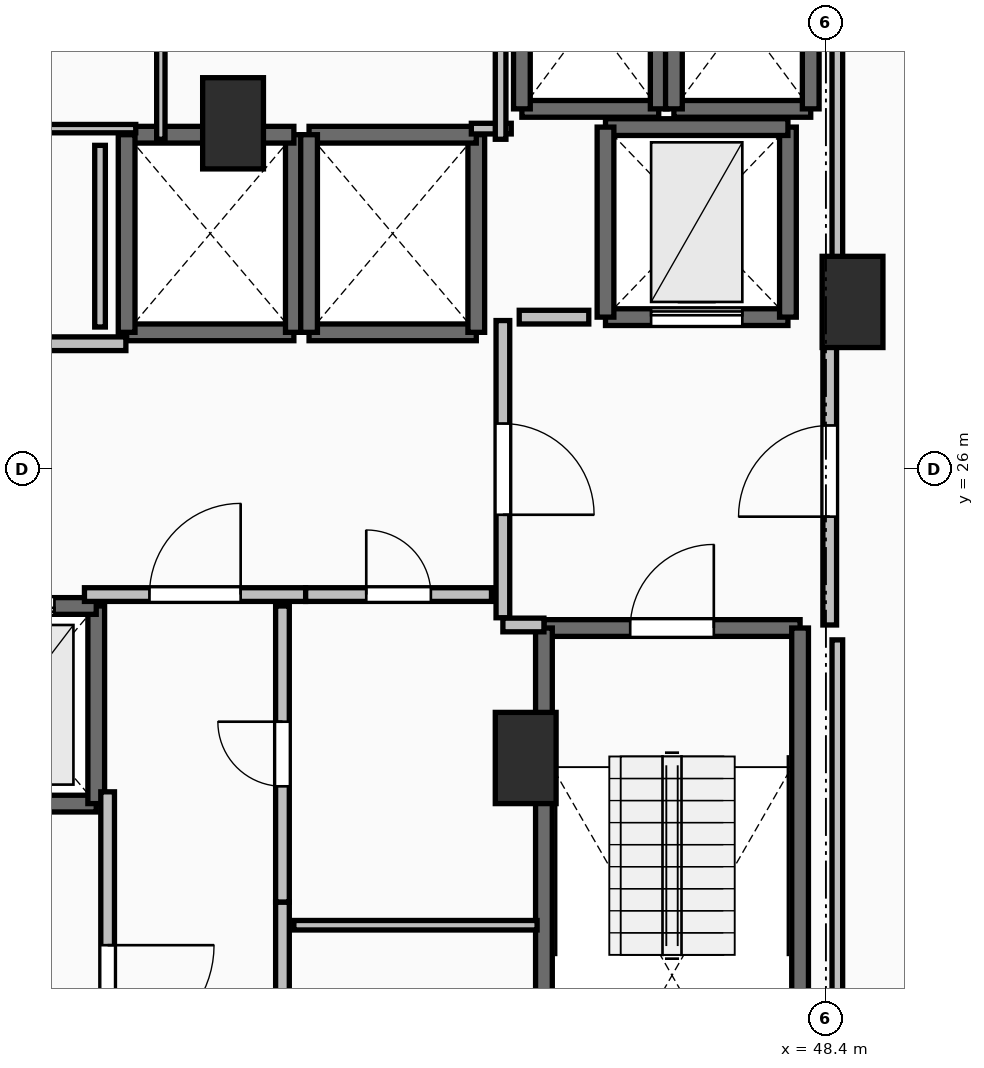
"""IFC4 building model, lengths in metres.
Left out: names, types, materials, properties, quantities, classifications, styles, units other than length and angle.
Written with IfcOpenShell. Run it as: python <this file> out.ifc"""

import sys

from ifc_helpers import new_model, si_unit, direction, frame, frame_2d, origin, origin_2d, place, context, subcontext, project, spatial, rectangle, extrude, element, fill, save


model = new_model("IFC4")
c1 = context("Model", 3, precision=1e-05, world=origin(), true_north=direction((0.0, 1.0)))
c2 = subcontext(c1, "Body", "Model", "MODEL_VIEW")
j1 = project(units=[si_unit("LENGTHUNIT", "METRE"), si_unit("PLANEANGLEUNIT", "RADIAN")], contexts=[c1])
p1 = place(None, origin())
s1 = spatial("IfcSite", under=j1, at=p1, CompositionType="ELEMENT")
p2 = place(p1, origin())
s2 = spatial("IfcBuilding", under=s1, at=p2, CompositionType="ELEMENT")
p3 = place(p2, frame((0.0, 0.0, 167.6)))
s3 = spatial("IfcBuildingStorey", under=s2, at=p3, CompositionType="ELEMENT", Elevation=167.6)
for number, where, z_axis, x_axis in (
    (1, (48.75, 28.2, 0.0), (0.0, 0.0, 1.0), (1.0, 0.0, 0.0)),
    (2, (44.45, 22.2, 0.0), (0.0, 0.0, 1.0), (1.0, 0.0, 0.0)),
    (3, (40.6, 30.55, 0.0), (0.0, 0.0, 1.0), (1.0, 0.0, 0.0)),
):
    element("IfcColumn", number, at=place(p3, frame(where, z_axis=z_axis, x_axis=x_axis)), inside=s3, PredefinedType="PILASTER", context=c2, shape_type="SweptSolid", body=[
        extrude(rectangle(XDim=0.8, YDim=1.2, at=origin_2d()), origin(), (0.0, 0.0, 1.0), 3.5),
    ])
p4 = place(p3, frame((44.69, 23.91, 0.0), z_axis=(0.0, 0.0, 1.0), x_axis=(1.0, 0.0, 0.0)))
e4 = element("IfcWall", 4, at=p4, inside=s3, PredefinedType="SOLIDWALL", context=c2, shape_type="SweptSolid", body=[
    extrude(rectangle(XDim=3.37, YDim=0.22, at=frame_2d((1.685, 0.0))), origin(), (0.0, 0.0, 1.0), 3.24),
])
p5 = place(p4, frame((1.135, 0.0, 0.0)))
e5 = element("IfcOpeningElement", 5, at=p5, cuts=e4, PredefinedType="OPENING", context=c2, shape_type="SweptSolid", body=[
    extrude(rectangle(XDim=1.1, YDim=2.15, at=frame_2d((0.55, 1.075))), frame((0.0, 0.125, 0.0), z_axis=(0.0, -1.0, 0.0), x_axis=(1.0, 0.0, 0.0)), (0.0, 0.0, 1.0), 0.25),
])
for number, where, z_axis, x_axis in (
    (6, (48.06, 23.91, 0.0), (0.0, 0.0, 1.0), (0.0, -1.0, 0.0)),
    (7, (44.69, 16.49, 0.0), (0.0, 0.0, 1.0), (0.0, 1.0, 0.0)),
):
    element("IfcWall", number, at=place(p3, frame(where, z_axis=z_axis, x_axis=x_axis)), inside=s3, PredefinedType="SOLIDWALL", context=c2, shape_type="SweptSolid", body=[
        extrude(rectangle(XDim=7.42, YDim=0.22, at=frame_2d((3.71, 0.0))), origin(), (0.0, 0.0, 1.0), 3.24),
    ])
p6 = place(p3, frame((36.6, 21.6, 0.0), z_axis=(0.0, 0.0, 1.0), x_axis=(1.0, 0.0, 0.0)))
e8 = element("IfcWall", 8, at=p6, inside=s3, PredefinedType="SOLIDWALL", context=c2, shape_type="SweptSolid", body=[
    extrude(rectangle(XDim=2.2, YDim=0.22, at=frame_2d((1.1, 0.0))), origin(), (0.0, 0.0, 1.0), 3.24),
])
p7 = place(p3, frame((38.8, 21.6, 0.0), z_axis=(0.0, 0.0, 1.0), x_axis=(0.0, 1.0, 0.0)))
e9 = element("IfcWall", 9, at=p7, inside=s3, PredefinedType="SOLIDWALL", context=c2, shape_type="SweptSolid", body=[
    extrude(rectangle(XDim=2.6, YDim=0.22, at=frame_2d((1.3, 0.0))), origin(), (0.0, 0.0, 1.0), 3.24),
])
p8 = place(p3, frame((38.8, 24.2, 0.0), z_axis=(0.0, 0.0, 1.0), x_axis=(-1.0, 0.0, 0.0)))
e10 = element("IfcWall", 10, at=p8, inside=s3, PredefinedType="SOLIDWALL", context=c2, shape_type="SweptSolid", body=[
    extrude(rectangle(XDim=2.2, YDim=0.22, at=frame_2d((1.1, 0.0))), origin(), (0.0, 0.0, 1.0), 3.24),
])
p9 = place(p8, frame((0.55, 0.0, 0.0)))
e11 = element("IfcOpeningElement", 11, at=p9, cuts=e10, PredefinedType="OPENING", context=c2, shape_type="SweptSolid", body=[
    extrude(rectangle(XDim=1.1, YDim=2.2, at=frame_2d((0.55, 1.1))), frame((0.0, 0.125, 0.0), z_axis=(0.0, -1.0, 0.0), x_axis=(1.0, 0.0, 0.0)), (0.0, 0.0, 1.0), 0.25),
])
p10 = place(p3, frame((39.2, 27.8, 0.0), z_axis=(0.0, 0.0, 1.0), x_axis=(1.0, 0.0, 0.0)))
e12 = element("IfcWall", 12, at=p10, inside=s3, PredefinedType="SOLIDWALL", context=c2, shape_type="SweptSolid", body=[
    extrude(rectangle(XDim=2.2, YDim=0.22, at=frame_2d((1.1, 0.0))), origin(), (0.0, 0.0, 1.0), 3.24),
])
p11 = place(p3, frame((41.4, 27.8, 0.0), z_axis=(0.0, 0.0, 1.0), x_axis=(0.0, 1.0, 0.0)))
e13 = element("IfcWall", 13, at=p11, inside=s3, PredefinedType="SOLIDWALL", context=c2, shape_type="SweptSolid", body=[
    extrude(rectangle(XDim=2.6, YDim=0.22, at=frame_2d((1.3, 0.0))), origin(), (0.0, 0.0, 1.0), 3.24),
])
p12 = place(p3, frame((41.4, 30.4, 0.0), z_axis=(0.0, 0.0, 1.0), x_axis=(-1.0, 0.0, 0.0)))
e14 = element("IfcWall", 14, at=p12, inside=s3, PredefinedType="SOLIDWALL", context=c2, shape_type="SweptSolid", body=[
    extrude(rectangle(XDim=2.2, YDim=0.22, at=frame_2d((1.1, 0.0))), origin(), (0.0, 0.0, 1.0), 3.24),
])
p13 = place(p3, frame((39.2, 30.4, 0.0), z_axis=(0.0, 0.0, 1.0), x_axis=(0.0, -1.0, 0.0)))
e15 = element("IfcWall", 15, at=p13, inside=s3, PredefinedType="SOLIDWALL", context=c2, shape_type="SweptSolid", body=[
    extrude(rectangle(XDim=2.6, YDim=0.22, at=frame_2d((1.3, 0.0))), origin(), (0.0, 0.0, 1.0), 3.24),
])
p14 = place(p3, frame((41.6, 27.8, 0.0), z_axis=(0.0, 0.0, 1.0), x_axis=(1.0, 0.0, 0.0)))
e16 = element("IfcWall", 16, at=p14, inside=s3, PredefinedType="SOLIDWALL", context=c2, shape_type="SweptSolid", body=[
    extrude(rectangle(XDim=2.2, YDim=0.22, at=frame_2d((1.1, 0.0))), origin(), (0.0, 0.0, 1.0), 3.24),
])
p15 = place(p3, frame((43.8, 27.8, 0.0), z_axis=(0.0, 0.0, 1.0), x_axis=(0.0, 1.0, 0.0)))
e17 = element("IfcWall", 17, at=p15, inside=s3, PredefinedType="SOLIDWALL", context=c2, shape_type="SweptSolid", body=[
    extrude(rectangle(XDim=2.6, YDim=0.22, at=frame_2d((1.3, 0.0))), origin(), (0.0, 0.0, 1.0), 3.24),
])
p16 = place(p3, frame((43.8, 30.4, 0.0), z_axis=(0.0, 0.0, 1.0), x_axis=(-1.0, 0.0, 0.0)))
e18 = element("IfcWall", 18, at=p16, inside=s3, PredefinedType="SOLIDWALL", context=c2, shape_type="SweptSolid", body=[
    extrude(rectangle(XDim=2.2, YDim=0.22, at=frame_2d((1.1, 0.0))), origin(), (0.0, 0.0, 1.0), 3.24),
])
p17 = place(p3, frame((41.6, 30.4, 0.0), z_axis=(0.0, 0.0, 1.0), x_axis=(0.0, -1.0, 0.0)))
e19 = element("IfcWall", 19, at=p17, inside=s3, PredefinedType="SOLIDWALL", context=c2, shape_type="SweptSolid", body=[
    extrude(rectangle(XDim=2.6, YDim=0.22, at=frame_2d((1.3, 0.0))), origin(), (0.0, 0.0, 1.0), 3.24),
])
p18 = place(p3, frame((44.4, 30.74, 0.0), z_axis=(0.0, 0.0, 1.0), x_axis=(1.0, 0.0, 0.0)))
e20 = element("IfcWall", 20, at=p18, inside=s3, PredefinedType="SOLIDWALL", context=c2, shape_type="SweptSolid", body=[
    extrude(rectangle(XDim=1.8, YDim=0.22, at=frame_2d((0.9, 0.0))), origin(), (0.0, 0.0, 1.0), 3.24),
])
for number, where, z_axis, x_axis in (
    (21, (46.2, 30.74, 0.0), (0.0, 0.0, 1.0), (0.0, 1.0, 0.0)),
    (22, (44.4, 33.16, 0.0), (0.0, 0.0, 1.0), (0.0, -1.0, 0.0)),
):
    element("IfcWall", number, at=place(p3, frame(where, z_axis=z_axis, x_axis=x_axis)), inside=s3, PredefinedType="SOLIDWALL", context=c2, shape_type="SweptSolid", body=[
        extrude(rectangle(XDim=2.42, YDim=0.22, at=frame_2d((1.21, 0.0))), origin(), (0.0, 0.0, 1.0), 3.24),
    ])
p19 = place(p3, frame((46.4, 30.74, 0.0), z_axis=(0.0, 0.0, 1.0), x_axis=(1.0, 0.0, 0.0)))
e23 = element("IfcWall", 23, at=p19, inside=s3, PredefinedType="SOLIDWALL", context=c2, shape_type="SweptSolid", body=[
    extrude(rectangle(XDim=1.8, YDim=0.22, at=frame_2d((0.9, 0.0))), origin(), (0.0, 0.0, 1.0), 3.24),
])
for number, where, z_axis, x_axis in (
    (24, (48.2, 30.74, 0.0), (0.0, 0.0, 1.0), (0.0, 1.0, 0.0)),
    (25, (46.4, 33.16, 0.0), (0.0, 0.0, 1.0), (0.0, -1.0, 0.0)),
):
    element("IfcWall", number, at=place(p3, frame(where, z_axis=z_axis, x_axis=x_axis)), inside=s3, PredefinedType="SOLIDWALL", context=c2, shape_type="SweptSolid", body=[
        extrude(rectangle(XDim=2.42, YDim=0.22, at=frame_2d((1.21, 0.0))), origin(), (0.0, 0.0, 1.0), 3.24),
    ])
p20 = place(p3, frame((45.5, 28.0, 0.0), z_axis=(0.0, 0.0, 1.0), x_axis=(1.0, 0.0, 0.0)))
e26 = element("IfcWall", 26, at=p20, inside=s3, PredefinedType="SHEAR", context=c2, shape_type="SweptSolid", body=[
    extrude(rectangle(XDim=2.4, YDim=0.22, at=frame_2d((1.2, 0.0))), origin(), (0.0, 0.0, 1.0), 3.24),
])
p21 = place(p20, frame((0.6, 0.0, 0.0)))
e27 = element("IfcOpeningElement", 27, at=p21, cuts=e26, PredefinedType="OPENING", context=c2, shape_type="SweptSolid", body=[
    extrude(rectangle(XDim=1.2, YDim=2.2, at=frame_2d((0.6, 1.1))), frame((0.0, 0.125, 0.0), z_axis=(0.0, -1.0, 0.0), x_axis=(1.0, 0.0, 0.0)), (0.0, 0.0, 1.0), 0.25),
])
p22 = place(p3, frame((47.9, 28.0, 0.0), z_axis=(0.0, 0.0, 1.0), x_axis=(0.0, 1.0, 0.0)))
e28 = element("IfcWall", 28, at=p22, inside=s3, PredefinedType="SHEAR", context=c2, shape_type="SweptSolid", body=[
    extrude(rectangle(XDim=2.5, YDim=0.22, at=frame_2d((1.25, 0.0))), origin(), (0.0, 0.0, 1.0), 3.24),
])
p23 = place(p3, frame((47.9, 30.5, 0.0), z_axis=(0.0, 0.0, 1.0), x_axis=(-1.0, 0.0, 0.0)))
e29 = element("IfcWall", 29, at=p23, inside=s3, PredefinedType="SHEAR", context=c2, shape_type="SweptSolid", body=[
    extrude(rectangle(XDim=2.4, YDim=0.22, at=frame_2d((1.2, 0.0))), origin(), (0.0, 0.0, 1.0), 3.24),
])
p24 = place(p3, frame((45.5, 30.5, 0.0), z_axis=(0.0, 0.0, 1.0), x_axis=(0.0, -1.0, 0.0)))
e30 = element("IfcWall", 30, at=p24, inside=s3, PredefinedType="SHEAR", context=c2, shape_type="SweptSolid", body=[
    extrude(rectangle(XDim=2.5, YDim=0.22, at=frame_2d((1.25, 0.0))), origin(), (0.0, 0.0, 1.0), 3.24),
])
p25 = place(p3, frame((44.15, 27.955, 0.0), z_axis=(0.0, 0.0, 1.0), x_axis=(0.0, -1.0, 0.0)))
e31 = element("IfcWall", 31, at=p25, inside=s3, PredefinedType="PARTITIONING", context=c2, shape_type="SweptSolid", body=[
    extrude(rectangle(XDim=3.91, YDim=0.18, at=frame_2d((1.955, 0.0))), origin(), (0.0, 0.0, 1.0), 3.24),
])
p26 = place(p25, frame((1.355, 0.0, 0.0)))
e32 = element("IfcOpeningElement", 32, at=p26, cuts=e31, PredefinedType="OPENING", context=c2, shape_type="SweptSolid", body=[
    extrude(rectangle(XDim=1.2, YDim=2.15, at=frame_2d((0.6, 1.075))), frame((0.0, 0.105, 0.0), z_axis=(0.0, -1.0, 0.0), x_axis=(1.0, 0.0, 0.0)), (0.0, 0.0, 1.0), 0.21),
])
p27 = place(p3, frame((44.15, 23.95, 0.0), z_axis=(0.0, 0.0, 1.0), x_axis=(1.0, 0.0, 0.0)))
e33 = element("IfcWall", 33, at=p27, inside=s3, PredefinedType="PARTITIONING", context=c2, shape_type="SweptSolid", body=[
    extrude(rectangle(XDim=0.54, YDim=0.18, at=frame_2d((0.27, 0.0))), origin(), (0.0, 0.0, 1.0), 3.24),
])
p28 = place(p3, frame((48.45, 23.95, 0.0), z_axis=(0.0, 0.0, 1.0), x_axis=(0.0, 1.0, 0.0)))
e34 = element("IfcWall", 34, at=p28, inside=s3, PredefinedType="PARTITIONING", context=c2, shape_type="SweptSolid", body=[
    extrude(rectangle(XDim=4.05, YDim=0.18, at=frame_2d((2.025, 0.0))), origin(), (0.0, 0.0, 1.0), 3.24),
])
p29 = place(p28, frame((1.425, 0.0, 0.0)))
e35 = element("IfcOpeningElement", 35, at=p29, cuts=e34, PredefinedType="OPENING", context=c2, shape_type="SweptSolid", body=[
    extrude(rectangle(XDim=1.2, YDim=2.15, at=frame_2d((0.6, 1.075))), frame((0.0, 0.105, 0.0), z_axis=(0.0, -1.0, 0.0), x_axis=(1.0, 0.0, 0.0)), (0.0, 0.0, 1.0), 0.21),
])
p30 = place(p3, frame((38.645, 24.35, 0.0), z_axis=(0.0, 0.0, 1.0), x_axis=(1.0, 0.0, 0.0)))
e36 = element("IfcWall", 36, at=p30, inside=s3, PredefinedType="PARTITIONING", context=c2, shape_type="SweptSolid", body=[
    extrude(rectangle(XDim=2.91, YDim=0.18, at=frame_2d((1.455, 0.0))), origin(), (0.0, 0.0, 1.0), 3.24),
])
p31 = place(p30, frame((0.855, 0.0, 0.0)))
e37 = element("IfcOpeningElement", 37, at=p31, cuts=e36, PredefinedType="OPENING", context=c2, shape_type="SweptSolid", body=[
    extrude(rectangle(XDim=1.2, YDim=2.15, at=frame_2d((0.6, 1.075))), frame((0.0, 0.105, 0.0), z_axis=(0.0, -1.0, 0.0), x_axis=(1.0, 0.0, 0.0)), (0.0, 0.0, 1.0), 0.21),
])
p32 = place(p3, frame((41.555, 24.35, 0.0), z_axis=(0.0, 0.0, 1.0), x_axis=(1.0, 0.0, 0.0)))
e38 = element("IfcWall", 38, at=p32, inside=s3, PredefinedType="PARTITIONING", context=c2, shape_type="SweptSolid", body=[
    extrude(rectangle(XDim=2.445, YDim=0.18, at=frame_2d((1.223, 0.0))), origin(), (0.0, 0.0, 1.0), 3.24),
])
p33 = place(p32, frame((0.798, 0.0, 0.0)))
e39 = element("IfcOpeningElement", 39, at=p33, cuts=e38, PredefinedType="OPENING", context=c2, shape_type="SweptSolid", body=[
    extrude(rectangle(XDim=0.85, YDim=2.1, at=frame_2d((0.425, 1.05))), frame((0.0, 0.105, 0.0), z_axis=(0.0, -1.0, 0.0), x_axis=(1.0, 0.0, 0.0)), (0.0, 0.0, 1.0), 0.21),
])
p34 = place(p3, frame((39.19, 27.65, 0.0), z_axis=(0.0, 0.0, 1.0), x_axis=(-1.0, 0.0, 0.0)))
e40 = element("IfcWall", 40, at=p34, inside=s3, PredefinedType="PARTITIONING", context=c2, shape_type="SweptSolid", body=[
    extrude(rectangle(XDim=7.19, YDim=0.18, at=frame_2d((3.595, 0.0))), origin(), (0.0, 0.0, 1.0), 3.24),
])
p35 = place(p34, frame((3.095, 0.0, 0.0)))
e41 = element("IfcOpeningElement", 41, at=p35, cuts=e40, PredefinedType="OPENING", context=c2, shape_type="SweptSolid", body=[
    extrude(rectangle(XDim=1.0, YDim=2.15, at=frame_2d((0.5, 1.075))), frame((0.0, 0.105, 0.0), z_axis=(0.0, -1.0, 0.0), x_axis=(1.0, 0.0, 0.0)), (0.0, 0.0, 1.0), 0.21),
])
p36 = place(p3, frame((41.25, 16.32, 0.0), z_axis=(0.0, 0.0, 1.0), x_axis=(0.0, 1.0, 0.0)))
e42 = element("IfcWall", 42, at=p36, inside=s3, PredefinedType="PARTITIONING", context=c2, shape_type="SweptSolid", body=[
    extrude(rectangle(XDim=3.985, YDim=0.18, at=frame_2d((1.992, 0.0))), origin(), (0.0, 0.0, 1.0), 3.24),
])
p37 = place(p36, frame((1.593, 0.0, 0.0)))
e43 = element("IfcOpeningElement", 43, at=p37, cuts=e42, PredefinedType="OPENING", context=c2, shape_type="SweptSolid", body=[
    extrude(rectangle(XDim=0.8, YDim=2.05, at=frame_2d((0.4, 1.025))), frame((0.0, 0.105, 0.0), z_axis=(0.0, -1.0, 0.0), x_axis=(1.0, 0.0, 0.0)), (0.0, 0.0, 1.0), 0.21),
])
p38 = place(p3, frame((41.25, 20.305, 0.0), z_axis=(0.0, 0.0, 1.0), x_axis=(0.0, 1.0, 0.0)))
e44 = element("IfcWall", 44, at=p38, inside=s3, PredefinedType="PARTITIONING", context=c2, shape_type="SweptSolid", body=[
    extrude(rectangle(XDim=3.895, YDim=0.18, at=frame_2d((1.948, 0.0))), origin(), (0.0, 0.0, 1.0), 3.24),
])
p39 = place(p38, frame((1.522, 0.0, 0.0)))
e45 = element("IfcOpeningElement", 45, at=p39, cuts=e44, PredefinedType="OPENING", context=c2, shape_type="SweptSolid", body=[
    extrude(rectangle(XDim=0.85, YDim=2.1, at=frame_2d((0.425, 1.05))), frame((0.0, 0.105, 0.0), z_axis=(0.0, -1.0, 0.0), x_axis=(1.0, 0.0, 0.0)), (0.0, 0.0, 1.0), 0.21),
])
p40 = place(p3, frame((38.95, 21.755, 0.0), z_axis=(0.0, 0.0, 1.0), x_axis=(0.0, -1.0, 0.0)))
e46 = element("IfcWall", 46, at=p40, inside=s3, PredefinedType="PARTITIONING", context=c2, shape_type="SweptSolid", body=[
    extrude(rectangle(XDim=5.435, YDim=0.18, at=frame_2d((2.717, 0.0))), origin(), (0.0, 0.0, 1.0), 3.24),
])
p41 = place(p40, frame((2.018, 0.0, 0.0)))
e47 = element("IfcOpeningElement", 47, at=p41, cuts=e46, PredefinedType="OPENING", context=c2, shape_type="SweptSolid", body=[
    extrude(rectangle(XDim=1.4, YDim=2.2, at=frame_2d((0.7, 1.1))), frame((0.0, 0.105, 0.0), z_axis=(0.0, -1.0, 0.0), x_axis=(1.0, 0.0, 0.0)), (0.0, 0.0, 1.0), 0.21),
])
p42 = place(p3, frame((44.6, 20.0, 0.0), z_axis=(0.0, 0.0, 1.0), x_axis=(-1.0, 0.0, 0.0)))
e48 = element("IfcWall", 48, at=p42, inside=s3, PredefinedType="PARTITIONING", context=c2, shape_type="SweptSolid", body=[
    extrude(rectangle(XDim=3.2, YDim=0.125, at=frame_2d((1.6, 0.0))), origin(), (0.0, 0.0, 1.0), 3.24),
])
p43 = place(p3, frame((39.65, 30.34, 0.0), z_axis=(0.0, 0.0, 1.0), x_axis=(0.0, 1.0, 0.0)))
e49 = element("IfcWall", 49, at=p43, inside=s3, PredefinedType="PARTITIONING", context=c2, shape_type="SweptSolid", body=[
    extrude(rectangle(XDim=3.56, YDim=0.11, at=frame_2d((1.78, 0.0))), origin(), (0.0, 0.0, 1.0), 2.432),
])
p44 = place(p3, frame((36.16, 30.48, 0.0), z_axis=(0.0, 0.0, 1.0), x_axis=(1.0, 0.0, 0.0)))
e50 = element("IfcWall", 50, at=p44, inside=s3, PredefinedType="PARTITIONING", context=c2, shape_type="SweptSolid", body=[
    extrude(rectangle(XDim=3.16, YDim=0.11, at=frame_2d((1.58, 0.0))), origin(), (0.0, 0.0, 1.0), 2.432),
])
p45 = place(p3, frame((45.28, 28.0, 0.0), z_axis=(0.0, 0.0, 1.0), x_axis=(-1.0, 0.0, 0.0)))
e51 = element("IfcWall", 51, at=p45, inside=s3, PredefinedType="PARTITIONING", context=c2, shape_type="SweptSolid", body=[
    extrude(rectangle(XDim=0.915, YDim=0.18, at=frame_2d((0.458, 0.0))), origin(), (0.0, 0.0, 1.0), 3.24),
])
p46 = place(p3, frame((43.735, 30.48, 0.0), z_axis=(0.0, 0.0, 1.0), x_axis=(1.0, 0.0, 0.0)))
e52 = element("IfcWall", 52, at=p46, inside=s3, PredefinedType="PARTITIONING", context=c2, shape_type="SweptSolid", body=[
    extrude(rectangle(XDim=0.525, YDim=0.14, at=frame_2d((0.262, 0.0))), origin(), (0.0, 0.0, 1.0), 3.24),
])
p47 = place(p3, frame((44.12, 30.34, 0.0), z_axis=(0.0, 0.0, 1.0), x_axis=(0.0, 1.0, 0.0)))
e53 = element("IfcWall", 53, at=p47, inside=s3, PredefinedType="PARTITIONING", context=c2, shape_type="SweptSolid", body=[
    extrude(rectangle(XDim=2.66, YDim=0.14, at=frame_2d((1.33, 0.0))), origin(), (0.0, 0.0, 1.0), 3.24),
])
p48 = place(p3, frame((38.85, 27.87, 0.0), z_axis=(0.0, 0.0, 1.0), x_axis=(0.0, 1.0, 0.0)))
e54 = element("IfcWall", 54, at=p48, inside=s3, PredefinedType="PARTITIONING", context=c2, shape_type="SweptSolid", body=[
    extrude(rectangle(XDim=2.39, YDim=0.14, at=frame_2d((1.195, 0.0))), origin(), (0.0, 0.0, 1.0), 3.24),
])
p49 = place(p3, frame((48.55, 16.24, 0.0), z_axis=(0.0, 0.0, 1.0), x_axis=(0.0, 1.0, 0.0)))
e55 = element("IfcWall", 55, at=p49, inside=s3, PredefinedType="PARTITIONING", context=c2, shape_type="SweptSolid", body=[
    extrude(rectangle(XDim=7.514, YDim=0.14, at=frame_2d((3.757, 0.0))), origin(), (0.0, 0.0, 1.0), 2.432),
])
p50 = place(p3, frame((48.55, 28.196, 0.0), z_axis=(0.0, 0.0, 1.0), x_axis=(0.0, 1.0, 0.0)))
e56 = element("IfcWall", 56, at=p50, inside=s3, PredefinedType="PARTITIONING", context=c2, shape_type="SweptSolid", body=[
    extrude(rectangle(XDim=5.254, YDim=0.14, at=frame_2d((2.627, 0.0))), origin(), (0.0, 0.0, 1.0), 2.432),
])
p51 = place(p5, origin())
e57 = element("IfcDoor", 57, at=p51, inside=s3, OperationType="SINGLE_SWING_RIGHT", PredefinedType="DOOR", context=c2, shape_type="SweptSolid", body=[
    extrude(rectangle(XDim=1.1, YDim=2.15, at=frame_2d((0.55, 1.075))), frame((0.0, 0.025, 0.0), z_axis=(0.0, -1.0, 0.0), x_axis=(1.0, 0.0, 0.0)), (0.0, 0.0, 1.0), 0.05),
])
fill(e5, e57)
p52 = place(p9, origin())
e58 = element("IfcDoor", 58, at=p52, inside=s3, OperationType="SLIDING_TO_LEFT", PredefinedType="DOOR", context=c2, shape_type="SweptSolid", body=[
    extrude(rectangle(XDim=1.1, YDim=2.2, at=frame_2d((0.55, 1.1))), frame((0.0, 0.025, 0.0), z_axis=(0.0, -1.0, 0.0), x_axis=(1.0, 0.0, 0.0)), (0.0, 0.0, 1.0), 0.05),
])
fill(e11, e58)
p53 = place(p21, origin())
e59 = element("IfcDoor", 59, at=p53, inside=s3, OperationType="SLIDING_TO_LEFT", PredefinedType="DOOR", context=c2, shape_type="SweptSolid", body=[
    extrude(rectangle(XDim=1.2, YDim=2.2, at=frame_2d((0.6, 1.1))), frame((0.0, 0.025, 0.0), z_axis=(0.0, -1.0, 0.0), x_axis=(1.0, 0.0, 0.0)), (0.0, 0.0, 1.0), 0.05),
])
fill(e27, e59)
p54 = place(p26, origin())
e60 = element("IfcDoor", 60, at=p54, inside=s3, OperationType="SINGLE_SWING_RIGHT", PredefinedType="DOOR", context=c2, shape_type="SweptSolid", body=[
    extrude(rectangle(XDim=1.2, YDim=2.15, at=frame_2d((0.6, 1.075))), frame((0.0, 0.025, 0.0), z_axis=(0.0, -1.0, 0.0), x_axis=(1.0, 0.0, 0.0)), (0.0, 0.0, 1.0), 0.05),
])
fill(e32, e60)
p55 = place(p29, origin())
e61 = element("IfcDoor", 61, at=p55, inside=s3, OperationType="SINGLE_SWING_LEFT", PredefinedType="DOOR", context=c2, shape_type="SweptSolid", body=[
    extrude(rectangle(XDim=1.2, YDim=2.15, at=frame_2d((0.6, 1.075))), frame((0.0, 0.025, 0.0), z_axis=(0.0, -1.0, 0.0), x_axis=(1.0, 0.0, 0.0)), (0.0, 0.0, 1.0), 0.05),
])
fill(e35, e61)
p56 = place(p31, origin())
e62 = element("IfcDoor", 62, at=p56, inside=s3, OperationType="SINGLE_SWING_RIGHT", PredefinedType="DOOR", context=c2, shape_type="SweptSolid", body=[
    extrude(rectangle(XDim=1.2, YDim=2.15, at=frame_2d((0.6, 1.075))), frame((0.0, 0.025, 0.0), z_axis=(0.0, -1.0, 0.0), x_axis=(1.0, 0.0, 0.0)), (0.0, 0.0, 1.0), 0.05),
])
fill(e37, e62)
p57 = place(p33, origin())
e63 = element("IfcDoor", 63, at=p57, inside=s3, OperationType="SINGLE_SWING_LEFT", PredefinedType="DOOR", context=c2, shape_type="SweptSolid", body=[
    extrude(rectangle(XDim=0.85, YDim=2.1, at=frame_2d((0.425, 1.05))), frame((0.0, 0.025, 0.0), z_axis=(0.0, -1.0, 0.0), x_axis=(1.0, 0.0, 0.0)), (0.0, 0.0, 1.0), 0.05),
])
fill(e39, e63)
p58 = place(p39, origin())
e64 = element("IfcDoor", 64, at=p58, inside=s3, OperationType="SINGLE_SWING_RIGHT", PredefinedType="DOOR", context=c2, shape_type="SweptSolid", body=[
    extrude(rectangle(XDim=0.85, YDim=2.1, at=frame_2d((0.425, 1.05))), frame((0.0, 0.025, 0.0), z_axis=(0.0, -1.0, 0.0), x_axis=(1.0, 0.0, 0.0)), (0.0, 0.0, 1.0), 0.05),
])
fill(e45, e64)
p59 = place(p41, origin())
e65 = element("IfcDoor", 65, at=p59, inside=s3, OperationType="DOUBLE_SWING_LEFT", PredefinedType="DOOR", context=c2, shape_type="SweptSolid", body=[
    extrude(rectangle(XDim=1.4, YDim=2.2, at=frame_2d((0.7, 1.1))), frame((0.0, 0.025, 0.0), z_axis=(0.0, -1.0, 0.0), x_axis=(1.0, 0.0, 0.0)), (0.0, 0.0, 1.0), 0.05),
])
fill(e47, e65)
save(model, sys.argv[1])
